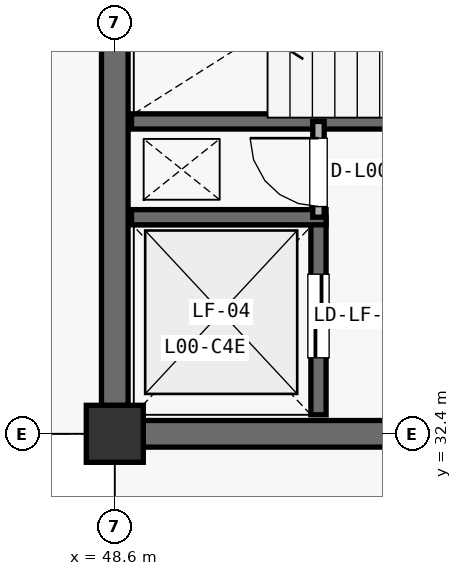
"""IFC4 building model, lengths in metres.
Left out: names, types, materials, properties, quantities, classifications, styles, units other than length and angle.
Written with IfcOpenShell. Run it as: python <this file> out.ifc"""

import sys

from ifc_helpers import new_model, si_unit, direction, frame, frame_2d, origin, origin_2d, place, context, subcontext, project, spatial, rectangle, circle, extrude, element, fill, save


model = new_model("IFC4")
c1 = context("Model", 3, precision=1e-05, world=origin(), true_north=direction((0.0, 1.0)))
c2 = subcontext(c1, "Body", "Model", "MODEL_VIEW")
j1 = project(units=[si_unit("LENGTHUNIT", "METRE"), si_unit("PLANEANGLEUNIT", "RADIAN")], contexts=[c1])
p1 = place(None, origin())
s1 = spatial("IfcSite", under=j1, at=p1, CompositionType="ELEMENT")
p2 = place(p1, origin())
s2 = spatial("IfcBuilding", under=s1, at=p2, CompositionType="ELEMENT")
p3 = place(p2, origin())
s3 = spatial("IfcBuildingStorey", under=s2, at=p3, CompositionType="ELEMENT", Elevation=0.0)
p4 = place(p3, frame((48.6, 32.4, 0.0), z_axis=(0.0, 0.0, 1.0), x_axis=(1.0, 0.0, 0.0)))
e1 = element("IfcColumn", 1, at=p4, inside=s3, PredefinedType="COLUMN", context=c2, shape_type="SweptSolid", body=[
    extrude(circle(Radius=0.375, at=origin_2d()), origin(), (0.0, 0.0, 1.0), 5.1),
])
p5 = place(p3, frame((48.6, 32.773, 0.0), z_axis=(0.0, 0.0, 1.0), x_axis=(0.0, 1.0, 0.0)))
e2 = element("IfcWall", 2, at=p5, inside=s3, PredefinedType="SHEAR", context=c2, shape_type="SweptSolid", body=[
    extrude(rectangle(XDim=7.404, YDim=0.35, at=frame_2d((3.702, 0.0))), origin(), (0.0, 0.0, 1.0), 4.822),
])
p6 = place(p3, frame((48.973, 32.4, 0.0), z_axis=(0.0, 0.0, 1.0), x_axis=(1.0, 0.0, 0.0)))
e3 = element("IfcWall", 3, at=p6, inside=s3, PredefinedType="SHEAR", context=c2, shape_type="SweptSolid", body=[
    extrude(rectangle(XDim=7.404, YDim=0.35, at=frame_2d((3.702, 0.0))), origin(), (0.0, 0.0, 1.0), 4.822),
])
p7 = place(p6, frame((4.277, 0.0, 0.0)))
e4 = element("IfcOpeningElement", 4, at=p7, cuts=e3, PredefinedType="OPENING", context=c2, shape_type="SweptSolid", body=[
    extrude(rectangle(XDim=1.2, YDim=2.2, at=frame_2d((0.6, 1.1))), frame((0.0, 0.185, 0.0), z_axis=(0.0, -1.0, 0.0), x_axis=(1.0, 0.0, 0.0)), (0.0, 0.0, 1.0), 0.37),
])
p8 = place(p3, frame((48.82, 36.51, 0.0), z_axis=(0.0, 0.0, 1.0), x_axis=(1.0, 0.0, 0.0)))
e5 = element("IfcWall", 5, at=p8, inside=s3, PredefinedType="SHEAR", context=c2, shape_type="SweptSolid", body=[
    extrude(rectangle(XDim=7.66, YDim=0.2, at=frame_2d((3.83, 0.0))), origin(), (0.0, 0.0, 1.0), 4.822),
])
p9 = place(p8, frame((6.11, 0.0, 0.0)))
e6 = element("IfcOpeningElement", 6, at=p9, cuts=e5, PredefinedType="OPENING", context=c2, shape_type="SweptSolid", body=[
    extrude(rectangle(XDim=1.15, YDim=2.2, at=frame_2d((0.575, 1.1))), frame((0.0, 0.11, 0.0), z_axis=(0.0, -1.0, 0.0), x_axis=(1.0, 0.0, 0.0)), (0.0, 0.0, 1.0), 0.22),
])
p10 = place(p3, frame((51.28, 32.65, 0.0), z_axis=(0.0, 0.0, 1.0), x_axis=(0.0, 1.0, 0.0)))
e7 = element("IfcWall", 7, at=p10, inside=s3, PredefinedType="SHEAR", context=c2, shape_type="SweptSolid", body=[
    extrude(rectangle(XDim=2.6, YDim=0.2, at=frame_2d((1.3, 0.0))), origin(), (0.0, 0.0, 1.0), 4.822),
])
p11 = place(p10, frame((0.75, 0.0, 0.0)))
e8 = element("IfcOpeningElement", 8, at=p11, cuts=e7, PredefinedType="OPENING", context=c2, shape_type="SweptSolid", body=[
    extrude(rectangle(XDim=1.1, YDim=2.2, at=frame_2d((0.55, 1.1))), frame((0.0, 0.11, 0.0), z_axis=(0.0, -1.0, 0.0), x_axis=(1.0, 0.0, 0.0)), (0.0, 0.0, 1.0), 0.22),
])
p12 = place(p3, frame((48.82, 35.25, 0.0), z_axis=(0.0, 0.0, 1.0), x_axis=(1.0, 0.0, 0.0)))
e9 = element("IfcWall", 9, at=p12, inside=s3, PredefinedType="SHEAR", context=c2, shape_type="SweptSolid", body=[
    extrude(rectangle(XDim=2.56, YDim=0.2, at=frame_2d((1.28, 0.0))), origin(), (0.0, 0.0, 1.0), 4.822),
])
p13 = place(p3, frame((51.28, 35.25, 0.0), z_axis=(0.0, 0.0, 1.0), x_axis=(0.0, 1.0, 0.0)))
e10 = element("IfcWall", 10, at=p13, inside=s3, PredefinedType="PARTITIONING", context=c2, shape_type="SweptSolid", body=[
    extrude(rectangle(XDim=1.26, YDim=0.15, at=frame_2d((0.63, 0.0))), origin(), (0.0, 0.0, 1.0), 4.822),
])
p14 = place(p13, frame((0.14, 0.0, 0.0)))
e11 = element("IfcOpeningElement", 11, at=p14, cuts=e10, PredefinedType="OPENING", context=c2, shape_type="SweptSolid", body=[
    extrude(rectangle(XDim=0.9, YDim=2.15, at=frame_2d((0.45, 1.075))), frame((0.0, 0.085, 0.0), z_axis=(0.0, -1.0, 0.0), x_axis=(1.0, 0.0, 0.0)), (0.0, 0.0, 1.0), 0.17),
])
p15 = place(p11, origin())
e12 = element("IfcDoor", 12, at=p15, inside=s3, OperationType="SLIDING_TO_LEFT", PredefinedType="DOOR", context=c2, shape_type="SweptSolid", body=[
    extrude(rectangle(XDim=1.1, YDim=2.2, at=frame_2d((0.55, 1.1))), frame((0.0, 0.025, 0.0), z_axis=(0.0, -1.0, 0.0), x_axis=(1.0, 0.0, 0.0)), (0.0, 0.0, 1.0), 0.05),
])
fill(e8, e12)
p16 = place(p14, origin())
e13 = element("IfcDoor", 13, at=p16, inside=s3, OperationType="SINGLE_SWING_RIGHT", PredefinedType="DOOR", context=c2, shape_type="SweptSolid", body=[
    extrude(rectangle(XDim=0.9, YDim=2.15, at=frame_2d((0.45, 1.075))), frame((0.0, 0.025, 0.0), z_axis=(0.0, -1.0, 0.0), x_axis=(1.0, 0.0, 0.0)), (0.0, 0.0, 1.0), 0.05),
])
fill(e11, e13)
save(model, sys.argv[1])
